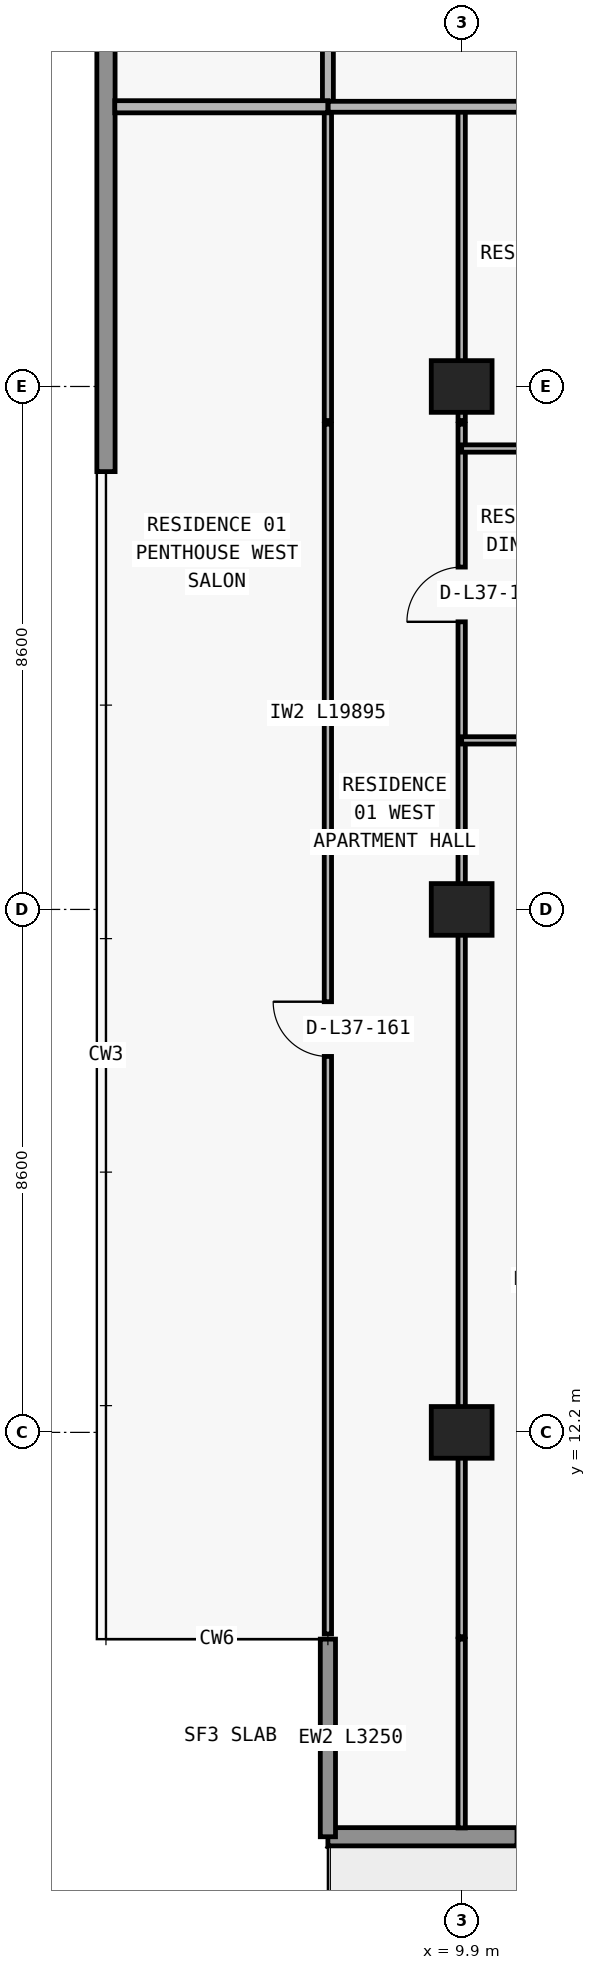
"""IFC4 building model, lengths in metres.
Left out: names, types, materials, properties, quantities, classifications, styles, units other than length and angle.
Written with IfcOpenShell. Run it as: python <this file> out.ifc"""

import sys

from ifc_helpers import new_model, si_unit, direction, frame, frame_2d, origin, origin_2d, place, context, subcontext, project, spatial, rectangle, extrude, element, fill, save


model = new_model("IFC4")
c1 = context("Model", 3, precision=1e-05, world=origin(), true_north=direction((0.0, 1.0)))
c2 = subcontext(c1, "Body", "Model", "MODEL_VIEW")
j1 = project(units=[si_unit("LENGTHUNIT", "METRE"), si_unit("PLANEANGLEUNIT", "RADIAN")], contexts=[c1])
p1 = place(None, origin())
s1 = spatial("IfcSite", under=j1, at=p1, CompositionType="ELEMENT")
p2 = place(p1, origin())
s2 = spatial("IfcBuilding", under=s1, at=p2, CompositionType="ELEMENT")
p3 = place(p2, frame((0.0, 0.0, 135.6)))
s3 = spatial("IfcBuildingStorey", under=s2, at=p3, CompositionType="ELEMENT", Elevation=135.6)
for number, where, z_axis, x_axis in (
    (1, (9.9, 12.2, 0.0), (0.0, 0.0, 1.0), (1.0, 0.0, 0.0)),
    (2, (9.9, 20.8, 0.0), (0.0, 0.0, 1.0), (1.0, 0.0, 0.0)),
    (3, (9.9, 29.4, 0.0), (0.0, 0.0, 1.0), (1.0, 0.0, 0.0)),
):
    element("IfcColumn", number, at=place(p3, frame(where, z_axis=z_axis, x_axis=x_axis)), inside=s3, PredefinedType="COLUMN", context=c2, shape_type="SweptSolid", body=[
        extrude(rectangle(XDim=1.0, YDim=0.85, at=origin_2d()), origin(), (0.0, 0.0, 1.0), 3.05),
    ])
p4 = place(p3, frame((70.1, 5.55, 0.0), z_axis=(0.0, 0.0, 1.0), x_axis=(-1.0, 0.0, 0.0)))
e4 = element("IfcWall", 4, at=p4, inside=s3, PredefinedType="STANDARD", context=c2, shape_type="SweptSolid", body=[
    extrude(rectangle(XDim=62.4, YDim=0.3, at=frame_2d((31.2, 0.0))), origin(), (0.0, 0.0, 1.0), 3.05),
])
p5 = place(p4, frame((57.29, 0.0, 0.0)))
e5 = element("IfcOpeningElement", 5, at=p5, cuts=e4, PredefinedType="OPENING", context=c2, shape_type="SweptSolid", body=[
    extrude(rectangle(XDim=2.0, YDim=2.3, at=frame_2d((1.0, 1.15))), frame((0.0, 0.16, 0.0), z_axis=(0.0, -1.0, 0.0), x_axis=(1.0, 0.0, 0.0)), (0.0, 0.0, 1.0), 0.32),
])
p6 = place(p4, frame((52.61, 0.0, 0.65)))
e6 = element("IfcOpeningElement", 6, at=p6, cuts=e4, PredefinedType="OPENING", context=c2, shape_type="SweptSolid", body=[
    extrude(rectangle(XDim=2.6, YDim=1.85, at=frame_2d((1.3, 0.925))), frame((0.0, 0.16, 0.0), z_axis=(0.0, -1.0, 0.0), x_axis=(1.0, 0.0, 0.0)), (0.0, 0.0, 1.0), 0.32),
])
p7 = place(p4, frame((46.5, 0.0, 0.85)))
e7 = element("IfcOpeningElement", 7, at=p7, cuts=e4, PredefinedType="OPENING", context=c2, shape_type="SweptSolid", body=[
    extrude(rectangle(XDim=2.2, YDim=1.55, at=frame_2d((1.1, 0.775))), frame((0.0, 0.16, 0.0), z_axis=(0.0, -1.0, 0.0), x_axis=(1.0, 0.0, 0.0)), (0.0, 0.0, 1.0), 0.32),
])
p8 = place(p4, frame((40.49, 0.0, 0.0)))
e8 = element("IfcOpeningElement", 8, at=p8, cuts=e4, PredefinedType="OPENING", context=c2, shape_type="SweptSolid", body=[
    extrude(rectangle(XDim=2.0, YDim=2.3, at=frame_2d((1.0, 1.15))), frame((0.0, 0.16, 0.0), z_axis=(0.0, -1.0, 0.0), x_axis=(1.0, 0.0, 0.0)), (0.0, 0.0, 1.0), 0.32),
])
p9 = place(p4, frame((35.81, 0.0, 0.65)))
e9 = element("IfcOpeningElement", 9, at=p9, cuts=e4, PredefinedType="OPENING", context=c2, shape_type="SweptSolid", body=[
    extrude(rectangle(XDim=2.6, YDim=1.85, at=frame_2d((1.3, 0.925))), frame((0.0, 0.16, 0.0), z_axis=(0.0, -1.0, 0.0), x_axis=(1.0, 0.0, 0.0)), (0.0, 0.0, 1.0), 0.32),
])
p10 = place(p4, frame((30.1, 0.0, 0.85)))
e10 = element("IfcOpeningElement", 10, at=p10, cuts=e4, PredefinedType="OPENING", context=c2, shape_type="SweptSolid", body=[
    extrude(rectangle(XDim=2.2, YDim=1.55, at=frame_2d((1.1, 0.775))), frame((0.0, 0.16, 0.0), z_axis=(0.0, -1.0, 0.0), x_axis=(1.0, 0.0, 0.0)), (0.0, 0.0, 1.0), 0.32),
])
p11 = place(p4, frame((22.1, 0.0, 0.85)))
e11 = element("IfcOpeningElement", 11, at=p11, cuts=e4, PredefinedType="OPENING", context=c2, shape_type="SweptSolid", body=[
    extrude(rectangle(XDim=2.2, YDim=1.55, at=frame_2d((1.1, 0.775))), frame((0.0, 0.16, 0.0), z_axis=(0.0, -1.0, 0.0), x_axis=(1.0, 0.0, 0.0)), (0.0, 0.0, 1.0), 0.32),
])
p12 = place(p4, frame((16.026, 0.0, 0.0)))
e12 = element("IfcOpeningElement", 12, at=p12, cuts=e4, PredefinedType="OPENING", context=c2, shape_type="SweptSolid", body=[
    extrude(rectangle(XDim=2.0, YDim=2.3, at=frame_2d((1.0, 1.15))), frame((0.0, 0.16, 0.0), z_axis=(0.0, -1.0, 0.0), x_axis=(1.0, 0.0, 0.0)), (0.0, 0.0, 1.0), 0.32),
])
p13 = place(p4, frame((11.726, 0.0, 0.85)))
e13 = element("IfcOpeningElement", 13, at=p13, cuts=e4, PredefinedType="OPENING", context=c2, shape_type="SweptSolid", body=[
    extrude(rectangle(XDim=2.2, YDim=1.55, at=frame_2d((1.1, 0.775))), frame((0.0, 0.16, 0.0), z_axis=(0.0, -1.0, 0.0), x_axis=(1.0, 0.0, 0.0)), (0.0, 0.0, 1.0), 0.32),
])
p14 = place(p4, frame((7.29, 0.0, 0.0)))
e14 = element("IfcOpeningElement", 14, at=p14, cuts=e4, PredefinedType="OPENING", context=c2, shape_type="SweptSolid", body=[
    extrude(rectangle(XDim=2.0, YDim=2.3, at=frame_2d((1.0, 1.15))), frame((0.0, 0.16, 0.0), z_axis=(0.0, -1.0, 0.0), x_axis=(1.0, 0.0, 0.0)), (0.0, 0.0, 1.0), 0.32),
])
p15 = place(p4, frame((3.19, 0.0, 0.85)))
e15 = element("IfcOpeningElement", 15, at=p15, cuts=e4, PredefinedType="OPENING", context=c2, shape_type="SweptSolid", body=[
    extrude(rectangle(XDim=1.8, YDim=1.55, at=frame_2d((0.9, 0.775))), frame((0.0, 0.16, 0.0), z_axis=(0.0, -1.0, 0.0), x_axis=(1.0, 0.0, 0.0)), (0.0, 0.0, 1.0), 0.32),
])
p16 = place(p3, frame((7.7, 8.8, 0.0), z_axis=(0.0, 0.0, 1.0), x_axis=(0.0, -1.0, 0.0)))
e16 = element("IfcWall", 16, at=p16, inside=s3, PredefinedType="ELEMENTEDWALL", context=c2, shape_type="SweptSolid", body=[
    extrude(rectangle(XDim=3.25, YDim=0.25, at=frame_2d((1.625, 0.0))), origin(), (0.0, 0.0, 1.0), 3.05),
])
p17 = place(p3, frame((4.05, 28.0, 0.0), z_axis=(0.0, 0.0, 1.0), x_axis=(0.0, 1.0, 0.0)))
e17 = element("IfcWall", 17, at=p17, inside=s3, PredefinedType="STANDARD", context=c2, shape_type="SweptSolid", body=[
    extrude(rectangle(XDim=19.2, YDim=0.3, at=frame_2d((9.6, 0.0))), origin(), (0.0, 0.0, 1.0), 3.05),
])
p18 = place(p3, frame((7.7, 8.885, 0.0), z_axis=(0.0, 0.0, 1.0), x_axis=(0.0, 1.0, 0.0)))
e18 = element("IfcWall", 18, at=p18, inside=s3, PredefinedType="PARTITIONING", context=c2, shape_type="SweptSolid", body=[
    extrude(rectangle(XDim=19.895, YDim=0.12, at=frame_2d((9.948, 0.0))), origin(), (0.0, 0.0, 1.0), 3.05),
])
p19 = place(p18, frame((9.498, 0.0, 0.0)))
e19 = element("IfcOpeningElement", 19, at=p19, cuts=e18, PredefinedType="OPENING", context=c2, shape_type="SweptSolid", body=[
    extrude(rectangle(XDim=0.9, YDim=2.15, at=frame_2d((0.45, 1.075))), frame((0.0, 0.07, 0.0), z_axis=(0.0, -1.0, 0.0), x_axis=(1.0, 0.0, 0.0)), (0.0, 0.0, 1.0), 0.14),
])
p20 = place(p3, frame((7.7, 28.84, 0.0), z_axis=(0.0, 0.0, 1.0), x_axis=(0.0, 1.0, 0.0)))
e20 = element("IfcWall", 20, at=p20, inside=s3, PredefinedType="PARTITIONING", context=c2, shape_type="SweptSolid", body=[
    extrude(rectangle(XDim=5.16, YDim=0.12, at=frame_2d((2.58, 0.0))), origin(), (0.0, 0.0, 1.0), 3.05),
])
p21 = place(p3, frame((7.7, 34.005, 0.0), z_axis=(0.0, 0.0, 1.0), x_axis=(0.0, 1.0, 0.0)))
e21 = element("IfcWall", 21, at=p21, inside=s3, PredefinedType="PARTITIONING", context=c2, shape_type="SweptSolid", body=[
    extrude(rectangle(XDim=2.945, YDim=0.18, at=frame_2d((1.473, 0.0))), origin(), (0.0, 0.0, 1.0), 3.05),
])
p22 = place(p3, frame((9.9, 5.695, 0.0), z_axis=(0.0, 0.0, 1.0), x_axis=(0.0, 1.0, 0.0)))
e22 = element("IfcWall", 22, at=p22, inside=s3, PredefinedType="PARTITIONING", context=c2, shape_type="SweptSolid", body=[
    extrude(rectangle(XDim=3.105, YDim=0.12, at=frame_2d((1.552, 0.0))), origin(), (0.0, 0.0, 1.0), 3.05),
])
p23 = place(p3, frame((9.9, 8.84, 0.0), z_axis=(0.0, 0.0, 1.0), x_axis=(0.0, 1.0, 0.0)))
e23 = element("IfcWall", 23, at=p23, inside=s3, PredefinedType="PARTITIONING", context=c2, shape_type="SweptSolid", body=[
    extrude(rectangle(XDim=19.94, YDim=0.12, at=frame_2d((9.97, 0.0))), origin(), (0.0, 0.0, 1.0), 2.174),
])
p24 = place(p23, frame((16.69, 0.0, 0.0)))
e24 = element("IfcOpeningElement", 24, at=p24, cuts=e23, PredefinedType="OPENING", context=c2, shape_type="SweptSolid", body=[
    extrude(rectangle(XDim=0.9, YDim=2.124, at=frame_2d((0.45, 1.062))), frame((0.0, 0.07, 0.0), z_axis=(0.0, -1.0, 0.0), x_axis=(1.0, 0.0, 0.0)), (0.0, 0.0, 1.0), 0.14),
])
p25 = place(p3, frame((9.9, 28.84, 0.0), z_axis=(0.0, 0.0, 1.0), x_axis=(0.0, 1.0, 0.0)))
e25 = element("IfcWall", 25, at=p25, inside=s3, PredefinedType="PARTITIONING", context=c2, shape_type="SweptSolid", body=[
    extrude(rectangle(XDim=5.16, YDim=0.12, at=frame_2d((2.58, 0.0))), origin(), (0.0, 0.0, 1.0), 2.174),
])
p26 = place(p3, frame((9.9, 23.58, 0.0), z_axis=(0.0, 0.0, 1.0), x_axis=(1.0, 0.0, 0.0)))
e26 = element("IfcWall", 26, at=p26, inside=s3, PredefinedType="PARTITIONING", context=c2, shape_type="SweptSolid", body=[
    extrude(rectangle(XDim=8.35, YDim=0.12, at=frame_2d((4.175, 0.0))), origin(), (0.0, 0.0, 1.0), 3.05),
])
p27 = place(p26, frame((1.44, 0.0, 0.0)))
e27 = element("IfcOpeningElement", 27, at=p27, cuts=e26, PredefinedType="OPENING", context=c2, shape_type="SweptSolid", body=[
    extrude(rectangle(XDim=0.9, YDim=2.15, at=frame_2d((0.45, 1.075))), frame((0.0, 0.07, 0.0), z_axis=(0.0, -1.0, 0.0), x_axis=(1.0, 0.0, 0.0)), (0.0, 0.0, 1.0), 0.14),
])
p28 = place(p3, frame((9.9, 28.38, 0.0), z_axis=(0.0, 0.0, 1.0), x_axis=(1.0, 0.0, 0.0)))
e28 = element("IfcWall", 28, at=p28, inside=s3, PredefinedType="PARTITIONING", context=c2, shape_type="SweptSolid", body=[
    extrude(rectangle(XDim=8.35, YDim=0.12, at=frame_2d((4.175, 0.0))), origin(), (0.0, 0.0, 1.0), 3.05),
])
p29 = place(p28, frame((1.44, 0.0, 0.0)))
e29 = element("IfcOpeningElement", 29, at=p29, cuts=e28, PredefinedType="OPENING", context=c2, shape_type="SweptSolid", body=[
    extrude(rectangle(XDim=0.9, YDim=2.15, at=frame_2d((0.45, 1.075))), frame((0.0, 0.07, 0.0), z_axis=(0.0, -1.0, 0.0), x_axis=(1.0, 0.0, 0.0)), (0.0, 0.0, 1.0), 0.14),
])
p30 = place(p3, frame((4.195, 34.0, 0.0), z_axis=(0.0, 0.0, 1.0), x_axis=(1.0, 0.0, 0.0)))
e30 = element("IfcWall", 30, at=p30, inside=s3, PredefinedType="PARTITIONING", context=c2, shape_type="SweptSolid", body=[
    extrude(rectangle(XDim=3.505, YDim=0.2, at=frame_2d((1.752, 0.0))), origin(), (0.0, 0.0, 1.0), 3.05),
])
p31 = place(p3, frame((7.705, 34.0, 0.0), z_axis=(0.0, 0.0, 1.0), x_axis=(1.0, 0.0, 0.0)))
e31 = element("IfcWall", 31, at=p31, inside=s3, PredefinedType="PARTITIONING", context=c2, shape_type="SweptSolid", body=[
    extrude(rectangle(XDim=10.545, YDim=0.18, at=frame_2d((5.272, 0.0))), origin(), (0.0, 0.0, 1.0), 3.05),
])
p32 = place(p31, frame((4.979, 0.0, 0.0)))
e32 = element("IfcOpeningElement", 32, at=p32, cuts=e31, PredefinedType="OPENING", context=c2, shape_type="SweptSolid", body=[
    extrude(rectangle(XDim=1.0, YDim=2.2, at=frame_2d((0.5, 1.1))), frame((0.0, 0.1, 0.0), z_axis=(0.0, -1.0, 0.0), x_axis=(1.0, 0.0, 0.0)), (0.0, 0.0, 1.0), 0.2),
])
p33 = place(p24, origin())
e33 = element("IfcDoor", 33, at=p33, inside=s3, OperationType="SINGLE_SWING_LEFT", PredefinedType="DOOR", context=c2, shape_type="SweptSolid", body=[
    extrude(rectangle(XDim=0.9, YDim=2.124, at=frame_2d((0.45, 1.062))), frame((0.0, 0.025, 0.0), z_axis=(0.0, -1.0, 0.0), x_axis=(1.0, 0.0, 0.0)), (0.0, 0.0, 1.0), 0.05),
])
fill(e24, e33)
p34 = place(p19, origin())
e34 = element("IfcDoor", 34, at=p34, inside=s3, OperationType="SINGLE_SWING_RIGHT", PredefinedType="DOOR", context=c2, shape_type="SweptSolid", body=[
    extrude(rectangle(XDim=0.9, YDim=2.15, at=frame_2d((0.45, 1.075))), frame((0.0, 0.025, 0.0), z_axis=(0.0, -1.0, 0.0), x_axis=(1.0, 0.0, 0.0)), (0.0, 0.0, 1.0), 0.05),
])
fill(e19, e34)
save(model, sys.argv[1])
